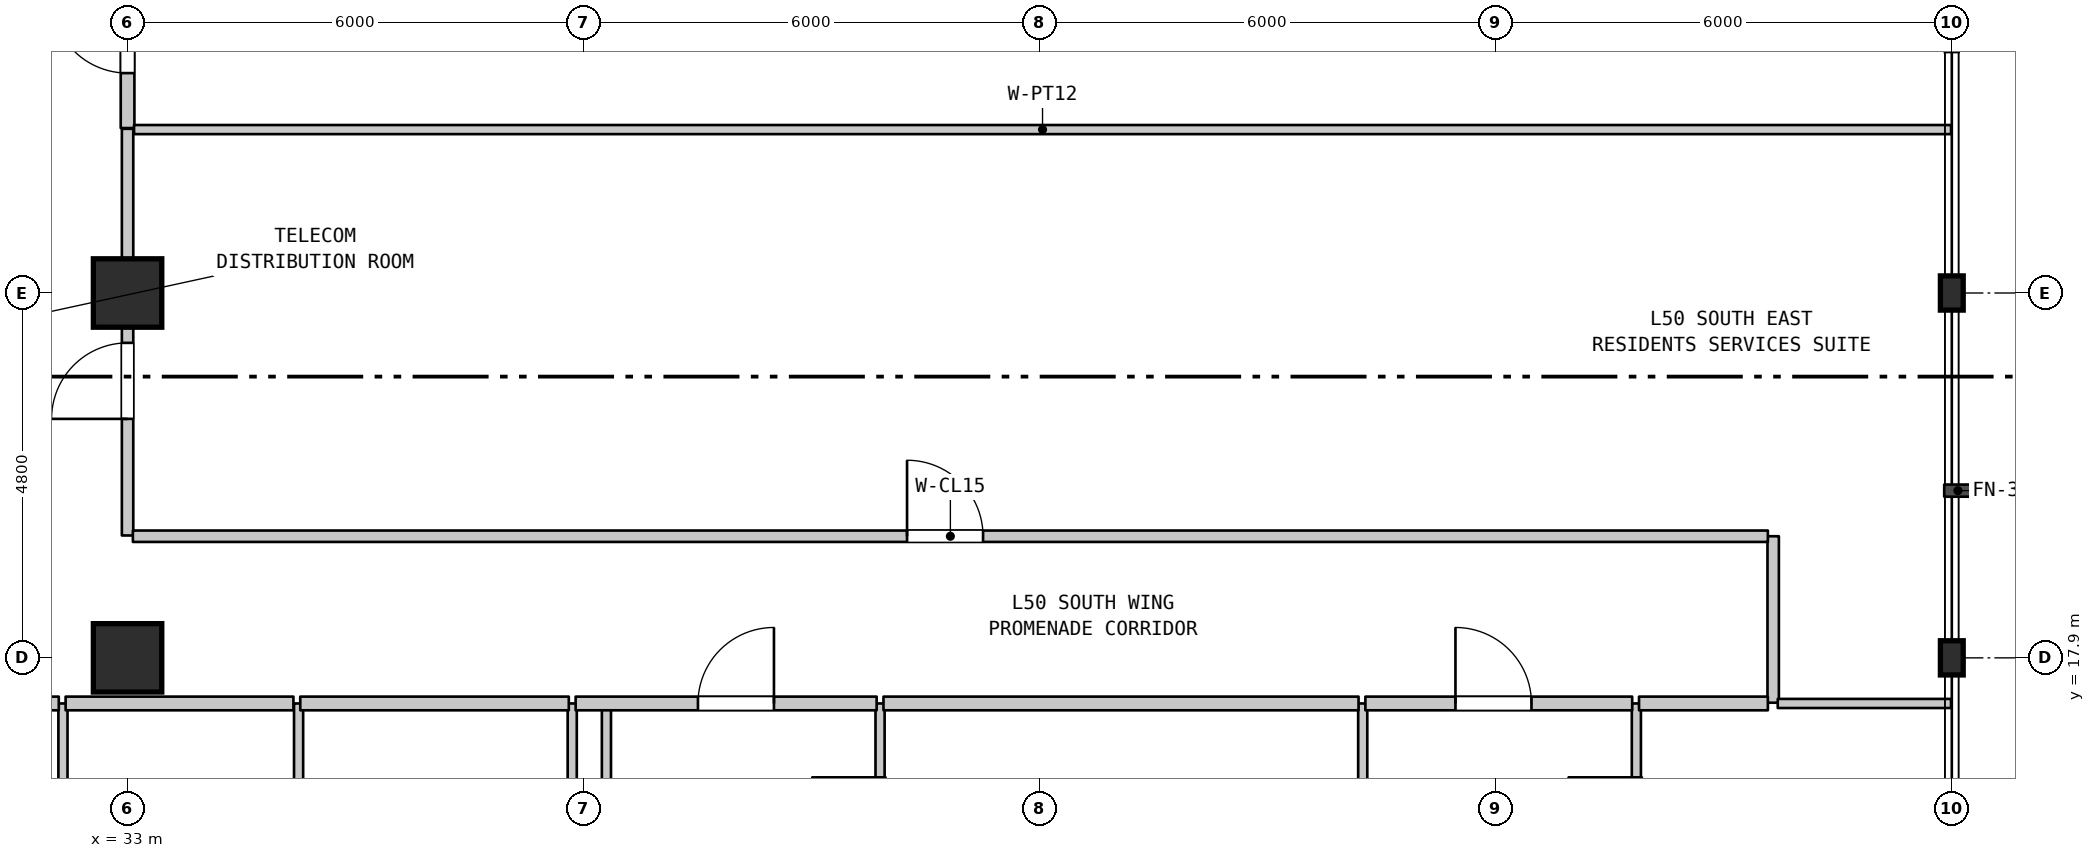
"""IFC4 building model, lengths in metres.
Left out: names, types, materials, properties, quantities, classifications, styles, units other than length and angle.
Written with IfcOpenShell. Run it as: python <this file> out.ifc"""

import sys

from ifc_helpers import new_model, si_unit, direction, frame, frame_2d, origin, origin_2d, place, context, subcontext, project, spatial, rectangle, i_section, extrude, element, fill, save


model = new_model("IFC4")
c1 = context("Model", 3, precision=1e-05, world=origin(), true_north=direction((0.0, 1.0)))
c2 = subcontext(c1, "Body", "Model", "MODEL_VIEW")
j1 = project(units=[si_unit("LENGTHUNIT", "METRE"), si_unit("PLANEANGLEUNIT", "RADIAN")], contexts=[c1])
p1 = place(None, origin())
s1 = spatial("IfcSite", under=j1, at=p1, CompositionType="ELEMENT")
p2 = place(p1, origin())
s2 = spatial("IfcBuilding", under=s1, at=p2, CompositionType="ELEMENT")
p3 = place(p2, frame((0.0, 0.0, 203.2)))
s3 = spatial("IfcBuildingStorey", under=s2, at=p3, CompositionType="ELEMENT", Elevation=203.2)
for number, where, z_axis, x_axis in (
    (1, (33.0, 17.9, 0.0), (0.0, 0.0, 1.0), (1.0, 0.0, 0.0)),
    (2, (33.0, 22.7, 0.0), (0.0, 0.0, 1.0), (1.0, 0.0, 0.0)),
):
    element("IfcColumn", number, at=place(p3, frame(where, z_axis=z_axis, x_axis=x_axis)), inside=s3, PredefinedType="COLUMN", context=c2, shape_type="SweptSolid", body=[
        extrude(rectangle(XDim=0.9, YDim=0.9, at=origin_2d()), origin(), (0.0, 0.0, 1.0), 3.7),
    ])
for number, where, z_axis, x_axis in (
    (3, (57.0, 17.9, 0.0), (0.0, 0.0, 1.0), (1.0, 0.0, 0.0)),
    (4, (57.0, 22.7, 0.0), (0.0, 0.0, 1.0), (1.0, 0.0, 0.0)),
):
    element("IfcColumn", number, at=place(p3, frame(where, z_axis=z_axis, x_axis=x_axis)), inside=s3, PredefinedType="COLUMN", context=c2, shape_type="SweptSolid", body=[
        extrude(i_section(OverallWidth=0.3, OverallDepth=0.45, WebThickness=0.014, FlangeThickness=0.026, FilletRadius=0.027, at=origin_2d()), origin(), (0.0, 0.0, 1.0), 3.7),
    ])
p4 = place(p3, frame((32.15, 11.15, 0.0), z_axis=(0.0, 0.0, 1.0), x_axis=(0.0, 1.0, 0.0)))
e5 = element("IfcWall", 5, at=p4, inside=s3, PredefinedType="PARTITIONING", context=c2, shape_type="SweptSolid", body=[
    extrude(rectangle(XDim=6.15, YDim=0.12, at=frame_2d((3.075, 0.0))), origin(), (0.0, 0.0, 1.0), 3.39),
])
p5 = place(p3, frame((33.0, 19.51, 0.0), z_axis=(0.0, 0.0, 1.0), x_axis=(0.0, 1.0, 0.0)))
e6 = element("IfcWall", 6, at=p5, inside=s3, PredefinedType="STANDARD", context=c2, shape_type="SweptSolid", body=[
    extrude(rectangle(XDim=5.35, YDim=0.15, at=frame_2d((2.675, 0.0))), origin(), (0.0, 0.0, 1.0), 2.99),
])
p6 = place(p5, frame((1.534, 0.0, 0.0)))
e7 = element("IfcOpeningElement", 7, at=p6, cuts=e6, PredefinedType="OPENING", context=c2, shape_type="SweptSolid", body=[
    extrude(rectangle(XDim=1.0, YDim=2.15, at=frame_2d((0.5, 1.075))), frame((0.0, 0.085, 0.0), z_axis=(0.0, -1.0, 0.0), x_axis=(1.0, 0.0, 0.0)), (0.0, 0.0, 1.0), 0.17),
])
p7 = place(p3, frame((33.0, 24.87, 0.0), z_axis=(0.0, 0.0, 1.0), x_axis=(0.0, 1.0, 0.0)))
e8 = element("IfcWall", 8, at=p7, inside=s3, PredefinedType="STANDARD", context=c2, shape_type="SweptSolid", body=[
    extrude(rectangle(XDim=2.6, YDim=0.18, at=frame_2d((1.3, 0.0))), origin(), (0.0, 0.0, 1.0), 2.99),
])
p8 = place(p7, frame((0.723, 0.0, 0.0)))
e9 = element("IfcOpeningElement", 9, at=p8, cuts=e8, PredefinedType="OPENING", context=c2, shape_type="SweptSolid", body=[
    extrude(rectangle(XDim=1.0, YDim=2.15, at=frame_2d((0.5, 1.075))), frame((0.0, 0.1, 0.0), z_axis=(0.0, -1.0, 0.0), x_axis=(1.0, 0.0, 0.0)), (0.0, 0.0, 1.0), 0.2),
])
for number, where, z_axis, x_axis in (
    (10, (35.25, 11.15, 0.0), (0.0, 0.0, 1.0), (0.0, 1.0, 0.0)),
    (11, (38.85, 11.15, 0.0), (0.0, 0.0, 1.0), (0.0, 1.0, 0.0)),
):
    element("IfcWall", number, at=place(p3, frame(where, z_axis=z_axis, x_axis=x_axis)), inside=s3, PredefinedType="PARTITIONING", context=c2, shape_type="SweptSolid", body=[
        extrude(rectangle(XDim=6.15, YDim=0.12, at=frame_2d((3.075, 0.0))), origin(), (0.0, 0.0, 1.0), 3.39),
    ])
p9 = place(p3, frame((39.3, 0.71, 0.0), z_axis=(0.0, 0.0, 1.0), x_axis=(0.0, 1.0, 0.0)))
e12 = element("IfcWall", 12, at=p9, inside=s3, PredefinedType="PARTITIONING", context=c2, shape_type="SweptSolid", body=[
    extrude(rectangle(XDim=16.59, YDim=0.12, at=frame_2d((8.295, 0.0))), origin(), (0.0, 0.0, 1.0), 3.39),
])
p10 = place(p3, frame((42.9, 14.6, 0.0), z_axis=(0.0, 0.0, 1.0), x_axis=(0.0, 1.0, 0.0)))
e13 = element("IfcWall", 13, at=p10, inside=s3, PredefinedType="PARTITIONING", context=c2, shape_type="SweptSolid", body=[
    extrude(rectangle(XDim=2.7, YDim=0.12, at=frame_2d((1.35, 0.0))), origin(), (0.0, 0.0, 1.0), 3.39),
])
p11 = place(p10, frame((0.828, 0.0, 0.0)))
e14 = element("IfcOpeningElement", 14, at=p11, cuts=e13, PredefinedType="OPENING", context=c2, shape_type="SweptSolid", body=[
    extrude(rectangle(XDim=0.9, YDim=2.1, at=frame_2d((0.45, 1.05))), frame((0.0, 0.07, 0.0), z_axis=(0.0, -1.0, 0.0), x_axis=(1.0, 0.0, 0.0)), (0.0, 0.0, 1.0), 0.14),
])
p12 = place(p3, frame((49.25, 14.6, 0.0), z_axis=(0.0, 0.0, 1.0), x_axis=(0.0, 1.0, 0.0)))
e15 = element("IfcWall", 15, at=p12, inside=s3, PredefinedType="PARTITIONING", context=c2, shape_type="SweptSolid", body=[
    extrude(rectangle(XDim=2.7, YDim=0.12, at=frame_2d((1.35, 0.0))), origin(), (0.0, 0.0, 1.0), 3.39),
])
p13 = place(p3, frame((52.85, 14.6, 0.0), z_axis=(0.0, 0.0, 1.0), x_axis=(0.0, 1.0, 0.0)))
e16 = element("IfcWall", 16, at=p13, inside=s3, PredefinedType="PARTITIONING", context=c2, shape_type="SweptSolid", body=[
    extrude(rectangle(XDim=2.7, YDim=0.12, at=frame_2d((1.35, 0.0))), origin(), (0.0, 0.0, 1.0), 3.39),
])
p14 = place(p13, frame((0.828, 0.0, 0.0)))
e17 = element("IfcOpeningElement", 17, at=p14, cuts=e16, PredefinedType="OPENING", context=c2, shape_type="SweptSolid", body=[
    extrude(rectangle(XDim=0.9, YDim=2.1, at=frame_2d((0.45, 1.05))), frame((0.0, 0.07, 0.0), z_axis=(0.0, -1.0, 0.0), x_axis=(1.0, 0.0, 0.0)), (0.0, 0.0, 1.0), 0.14),
])
p15 = place(p3, frame((54.65, 17.31, 0.0), z_axis=(0.0, 0.0, 1.0), x_axis=(0.0, 1.0, 0.0)))
e18 = element("IfcWall", 18, at=p15, inside=s3, PredefinedType="STANDARD", context=c2, shape_type="SweptSolid", body=[
    extrude(rectangle(XDim=2.19, YDim=0.15, at=frame_2d((1.095, 0.0))), origin(), (0.0, 0.0, 1.0), 3.39),
])
p16 = place(p3, frame((27.645, 17.3, 0.0), z_axis=(0.0, 0.0, 1.0), x_axis=(1.0, 0.0, 0.0)))
e19 = element("IfcWall", 19, at=p16, inside=s3, PredefinedType="STANDARD", context=c2, shape_type="SweptSolid", body=[
    extrude(rectangle(XDim=4.45, YDim=0.18, at=frame_2d((2.225, 0.0))), origin(), (0.0, 0.0, 1.0), 3.39),
])
p17 = place(p16, frame((1.653, 0.0, 0.0)))
e20 = element("IfcOpeningElement", 20, at=p17, cuts=e19, PredefinedType="OPENING", context=c2, shape_type="SweptSolid", body=[
    extrude(rectangle(XDim=1.0, YDim=2.15, at=frame_2d((0.5, 1.075))), frame((0.0, 0.1, 0.0), z_axis=(0.0, -1.0, 0.0), x_axis=(1.0, 0.0, 0.0)), (0.0, 0.0, 1.0), 0.2),
])
p18 = place(p3, frame((32.185, 17.3, 0.0), z_axis=(0.0, 0.0, 1.0), x_axis=(1.0, 0.0, 0.0)))
e21 = element("IfcWall", 21, at=p18, inside=s3, PredefinedType="STANDARD", context=c2, shape_type="SweptSolid", body=[
    extrude(rectangle(XDim=2.997, YDim=0.18, at=frame_2d((1.499, 0.0))), origin(), (0.0, 0.0, 1.0), 3.39),
])
p19 = place(p3, frame((35.272, 17.3, 0.0), z_axis=(0.0, 0.0, 1.0), x_axis=(1.0, 0.0, 0.0)))
e22 = element("IfcWall", 22, at=p19, inside=s3, PredefinedType="STANDARD", context=c2, shape_type="SweptSolid", body=[
    extrude(rectangle(XDim=3.533, YDim=0.18, at=frame_2d((1.767, 0.0))), origin(), (0.0, 0.0, 1.0), 3.39),
])
p20 = place(p3, frame((38.895, 17.3, 0.0), z_axis=(0.0, 0.0, 1.0), x_axis=(1.0, 0.0, 0.0)))
e23 = element("IfcWall", 23, at=p20, inside=s3, PredefinedType="STANDARD", context=c2, shape_type="SweptSolid", body=[
    extrude(rectangle(XDim=3.96, YDim=0.18, at=frame_2d((1.98, 0.0))), origin(), (0.0, 0.0, 1.0), 3.39),
])
p21 = place(p20, frame((1.609, 0.0, 0.0)))
e24 = element("IfcOpeningElement", 24, at=p21, cuts=e23, PredefinedType="OPENING", context=c2, shape_type="SweptSolid", body=[
    extrude(rectangle(XDim=1.0, YDim=2.15, at=frame_2d((0.5, 1.075))), frame((0.0, 0.1, 0.0), z_axis=(0.0, -1.0, 0.0), x_axis=(1.0, 0.0, 0.0)), (0.0, 0.0, 1.0), 0.2),
])
p22 = place(p3, frame((42.945, 17.3, 0.0), z_axis=(0.0, 0.0, 1.0), x_axis=(1.0, 0.0, 0.0)))
e25 = element("IfcWall", 25, at=p22, inside=s3, PredefinedType="STANDARD", context=c2, shape_type="SweptSolid", body=[
    extrude(rectangle(XDim=6.25, YDim=0.18, at=frame_2d((3.125, 0.0))), origin(), (0.0, 0.0, 1.0), 3.39),
])
p23 = place(p3, frame((49.285, 17.3, 0.0), z_axis=(0.0, 0.0, 1.0), x_axis=(1.0, 0.0, 0.0)))
e26 = element("IfcWall", 26, at=p23, inside=s3, PredefinedType="STANDARD", context=c2, shape_type="SweptSolid", body=[
    extrude(rectangle(XDim=3.51, YDim=0.18, at=frame_2d((1.755, 0.0))), origin(), (0.0, 0.0, 1.0), 3.39),
])
p24 = place(p23, frame((1.185, 0.0, 0.0)))
e27 = element("IfcOpeningElement", 27, at=p24, cuts=e26, PredefinedType="OPENING", context=c2, shape_type="SweptSolid", body=[
    extrude(rectangle(XDim=1.0, YDim=2.15, at=frame_2d((0.5, 1.075))), frame((0.0, 0.1, 0.0), z_axis=(0.0, -1.0, 0.0), x_axis=(1.0, 0.0, 0.0)), (0.0, 0.0, 1.0), 0.2),
])
p25 = place(p3, frame((52.885, 17.3, 0.0), z_axis=(0.0, 0.0, 1.0), x_axis=(1.0, 0.0, 0.0)))
e28 = element("IfcWall", 28, at=p25, inside=s3, PredefinedType="STANDARD", context=c2, shape_type="SweptSolid", body=[
    extrude(rectangle(XDim=1.695, YDim=0.18, at=frame_2d((0.848, 0.0))), origin(), (0.0, 0.0, 1.0), 3.39),
])
p26 = place(p3, frame((54.71, 17.3, 0.0), z_axis=(0.0, 0.0, 1.0), x_axis=(1.0, 0.0, 0.0)))
e29 = element("IfcWall", 29, at=p26, inside=s3, PredefinedType="PARTITIONING", context=c2, shape_type="SweptSolid", body=[
    extrude(rectangle(XDim=2.28, YDim=0.12, at=frame_2d((1.14, 0.0))), origin(), (0.0, 0.0, 1.0), 3.39),
])
p27 = place(p3, frame((33.07, 19.5, 0.0), z_axis=(0.0, 0.0, 1.0), x_axis=(1.0, 0.0, 0.0)))
e30 = element("IfcWall", 30, at=p27, inside=s3, PredefinedType="STANDARD", context=c2, shape_type="SweptSolid", body=[
    extrude(rectangle(XDim=21.51, YDim=0.15, at=frame_2d((10.755, 0.0))), origin(), (0.0, 0.0, 1.0), 3.39),
])
p28 = place(p27, frame((10.185, 0.0, 0.0)))
e31 = element("IfcOpeningElement", 31, at=p28, cuts=e30, PredefinedType="OPENING", context=c2, shape_type="SweptSolid", body=[
    extrude(rectangle(XDim=1.0, YDim=2.15, at=frame_2d((0.5, 1.075))), frame((0.0, 0.085, 0.0), z_axis=(0.0, -1.0, 0.0), x_axis=(1.0, 0.0, 0.0)), (0.0, 0.0, 1.0), 0.17),
])
p29 = place(p3, frame((33.085, 24.85, 0.0), z_axis=(0.0, 0.0, 1.0), x_axis=(1.0, 0.0, 0.0)))
e32 = element("IfcWall", 32, at=p29, inside=s3, PredefinedType="PARTITIONING", context=c2, shape_type="SweptSolid", body=[
    extrude(rectangle(XDim=23.905, YDim=0.12, at=frame_2d((11.953, 0.0))), origin(), (0.0, 0.0, 1.0), 3.39),
])
p30 = place(p6, origin())
e33 = element("IfcDoor", 33, at=p30, inside=s3, OperationType="SINGLE_SWING_LEFT", PredefinedType="DOOR", context=c2, shape_type="SweptSolid", body=[
    extrude(rectangle(XDim=1.0, YDim=2.15, at=frame_2d((0.5, 1.075))), frame((0.0, 0.025, 0.0), z_axis=(0.0, -1.0, 0.0), x_axis=(1.0, 0.0, 0.0)), (0.0, 0.0, 1.0), 0.05),
])
fill(e7, e33)
p31 = place(p8, origin())
e34 = element("IfcDoor", 34, at=p31, inside=s3, OperationType="SINGLE_SWING_RIGHT", PredefinedType="DOOR", context=c2, shape_type="SweptSolid", body=[
    extrude(rectangle(XDim=1.0, YDim=2.15, at=frame_2d((0.5, 1.075))), frame((0.0, 0.025, 0.0), z_axis=(0.0, -1.0, 0.0), x_axis=(1.0, 0.0, 0.0)), (0.0, 0.0, 1.0), 0.05),
])
fill(e9, e34)
p32 = place(p11, origin())
e35 = element("IfcDoor", 35, at=p32, inside=s3, OperationType="SINGLE_SWING_RIGHT", PredefinedType="DOOR", context=c2, shape_type="SweptSolid", body=[
    extrude(rectangle(XDim=0.9, YDim=2.1, at=frame_2d((0.45, 1.05))), frame((0.0, 0.025, 0.0), z_axis=(0.0, -1.0, 0.0), x_axis=(1.0, 0.0, 0.0)), (0.0, 0.0, 1.0), 0.05),
])
fill(e14, e35)
p33 = place(p14, origin())
e36 = element("IfcDoor", 36, at=p33, inside=s3, OperationType="SINGLE_SWING_RIGHT", PredefinedType="DOOR", context=c2, shape_type="SweptSolid", body=[
    extrude(rectangle(XDim=0.9, YDim=2.1, at=frame_2d((0.45, 1.05))), frame((0.0, 0.025, 0.0), z_axis=(0.0, -1.0, 0.0), x_axis=(1.0, 0.0, 0.0)), (0.0, 0.0, 1.0), 0.05),
])
fill(e17, e36)
p34 = place(p21, origin())
e37 = element("IfcDoor", 37, at=p34, inside=s3, OperationType="SINGLE_SWING_RIGHT", PredefinedType="DOOR", context=c2, shape_type="SweptSolid", body=[
    extrude(rectangle(XDim=1.0, YDim=2.15, at=frame_2d((0.5, 1.075))), frame((0.0, 0.025, 0.0), z_axis=(0.0, -1.0, 0.0), x_axis=(1.0, 0.0, 0.0)), (0.0, 0.0, 1.0), 0.05),
])
fill(e24, e37)
p35 = place(p24, origin())
e38 = element("IfcDoor", 38, at=p35, inside=s3, OperationType="SINGLE_SWING_LEFT", PredefinedType="DOOR", context=c2, shape_type="SweptSolid", body=[
    extrude(rectangle(XDim=1.0, YDim=2.15, at=frame_2d((0.5, 1.075))), frame((0.0, 0.025, 0.0), z_axis=(0.0, -1.0, 0.0), x_axis=(1.0, 0.0, 0.0)), (0.0, 0.0, 1.0), 0.05),
])
fill(e27, e38)
p36 = place(p28, origin())
e39 = element("IfcDoor", 39, at=p36, inside=s3, OperationType="SINGLE_SWING_LEFT", PredefinedType="DOOR", context=c2, shape_type="SweptSolid", body=[
    extrude(rectangle(XDim=1.0, YDim=2.15, at=frame_2d((0.5, 1.075))), frame((0.0, 0.025, 0.0), z_axis=(0.0, -1.0, 0.0), x_axis=(1.0, 0.0, 0.0)), (0.0, 0.0, 1.0), 0.05),
])
fill(e31, e39)
save(model, sys.argv[1])
